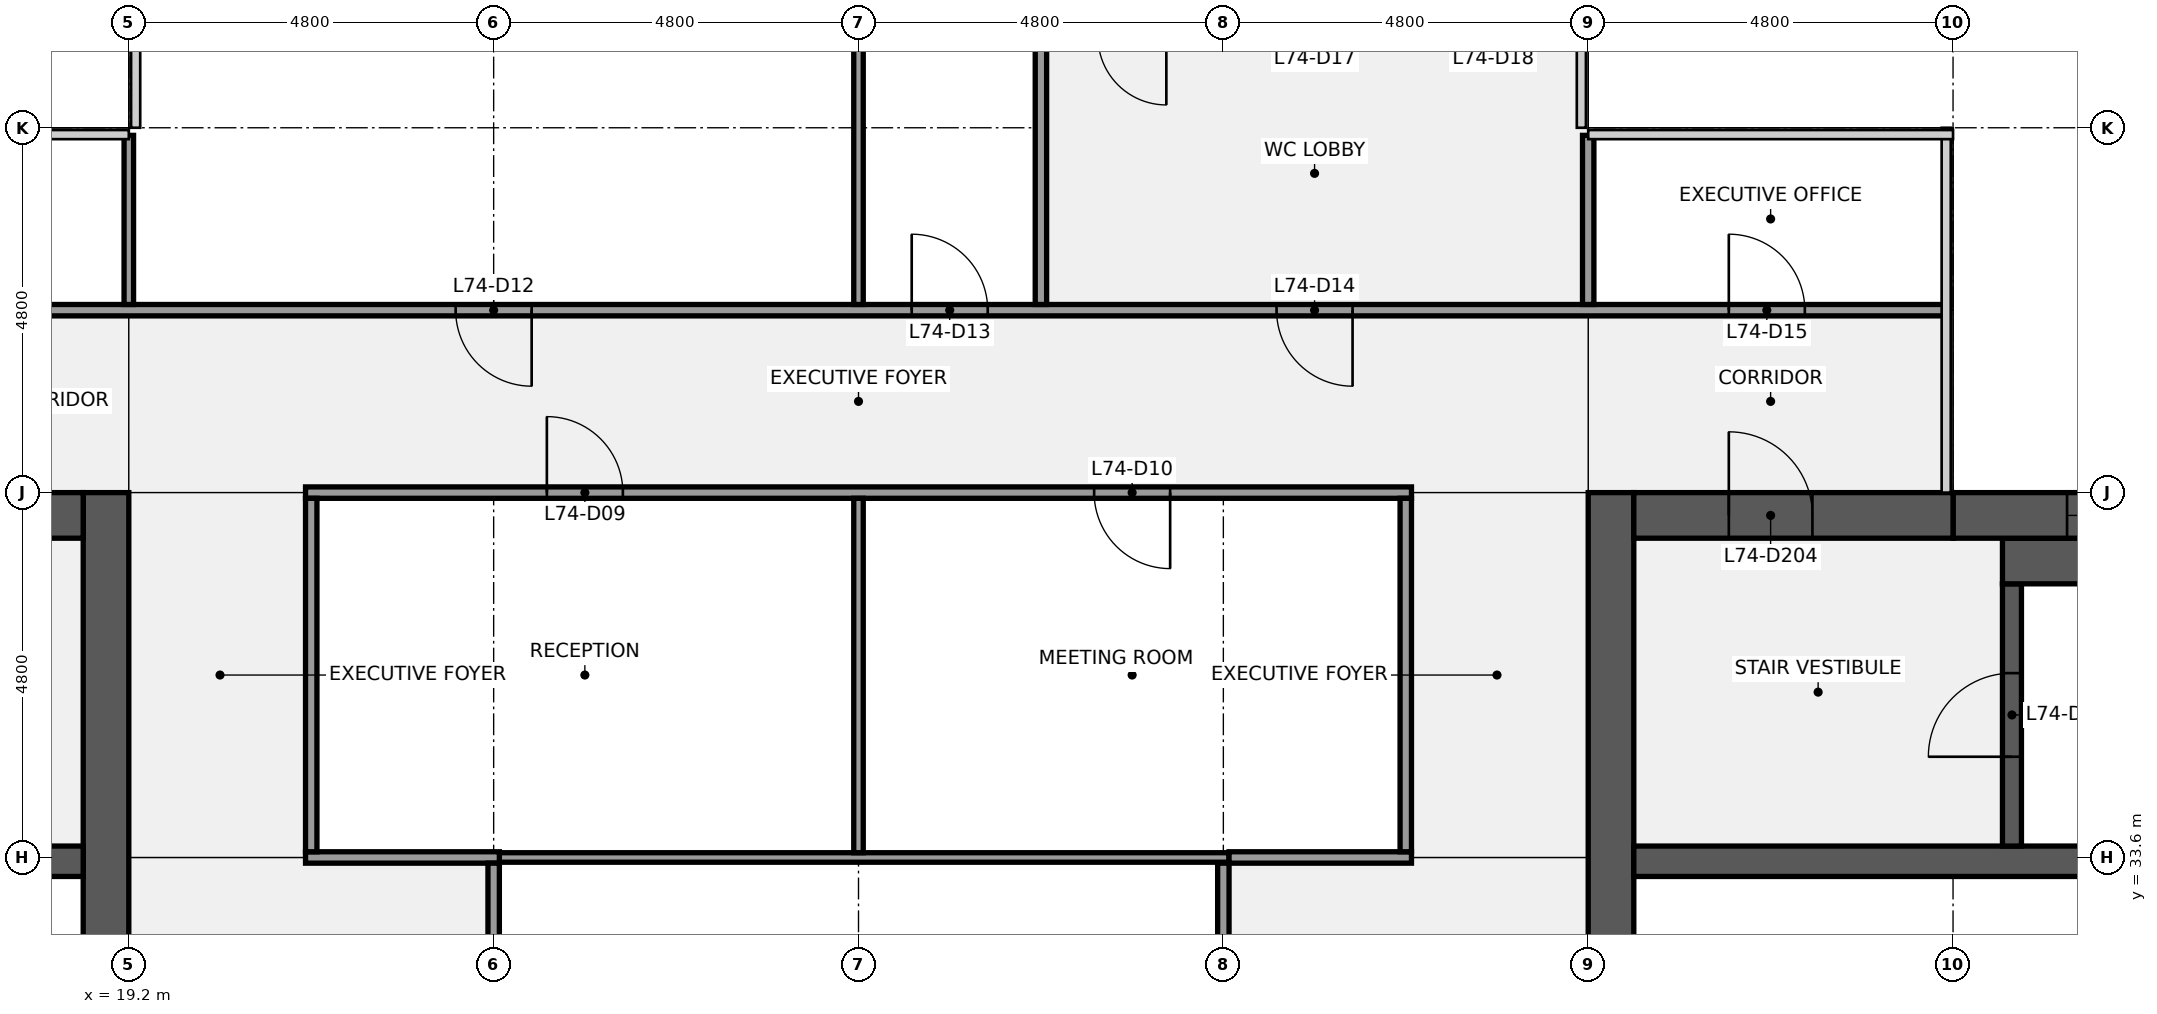
"""IFC4 building model, lengths in metres.
Left out: names, types, materials, properties, quantities, classifications, styles, units other than length and angle.
Written with IfcOpenShell. Run it as: python <this file> out.ifc"""

import sys

from ifc_helpers import new_model, si_unit, direction, frame, frame_2d, origin, place, context, subcontext, project, spatial, rectangle, extrude, element, fill, save


model = new_model("IFC4")
c1 = context("Model", 3, precision=1e-05, world=origin(), true_north=direction((0.0, 1.0)))
c2 = subcontext(c1, "Body", "Model", "MODEL_VIEW")
j1 = project(units=[si_unit("LENGTHUNIT", "METRE"), si_unit("PLANEANGLEUNIT", "RADIAN")], contexts=[c1])
p1 = place(None, origin())
s1 = spatial("IfcSite", under=j1, at=p1, CompositionType="ELEMENT")
p2 = place(p1, origin())
s2 = spatial("IfcBuilding", under=s1, at=p2, CompositionType="ELEMENT")
p3 = place(p2, frame((0.0, 0.0, 334.3)))
s3 = spatial("IfcBuildingStorey", under=s2, at=p3, CompositionType="ELEMENT", Elevation=334.3)
p4 = place(p3, frame((18.9, 38.4, 0.0), z_axis=(0.0, 0.0, 1.0), x_axis=(0.0, -1.0, 0.0)))
e1 = element("IfcWall", 1, at=p4, inside=s3, PredefinedType="SHEAR", context=c2, shape_type="SweptSolid", body=[
    extrude(rectangle(XDim=28.8, YDim=0.6, at=frame_2d((14.4, 0.0))), origin(), (0.0, 0.0, 1.0), 3.84),
])
p5 = place(p4, frame((18.3, 0.0, 0.0)))
e2 = element("IfcOpeningElement", 2, at=p5, cuts=e1, PredefinedType="OPENING", context=c2, shape_type="SweptSolid", body=[
    extrude(rectangle(XDim=1.8, YDim=2.1, at=frame_2d((0.9, 1.05))), frame((0.0, 0.31, 0.0), z_axis=(0.0, -1.0, 0.0), x_axis=(1.0, 0.0, 0.0)), (0.0, 0.0, 1.0), 0.62),
])
p6 = place(p4, frame((8.7, 0.0, 0.0)))
e3 = element("IfcOpeningElement", 3, at=p6, cuts=e1, PredefinedType="OPENING", context=c2, shape_type="SweptSolid", body=[
    extrude(rectangle(XDim=1.8, YDim=2.1, at=frame_2d((0.9, 1.05))), frame((0.0, 0.31, 0.0), z_axis=(0.0, -1.0, 0.0), x_axis=(1.0, 0.0, 0.0)), (0.0, 0.0, 1.0), 0.62),
])
p7 = place(p3, frame((0.6, 33.55, 0.0), z_axis=(0.0, 0.0, 1.0), x_axis=(1.0, 0.0, 0.0)))
e4 = element("IfcWall", 4, at=p7, inside=s3, PredefinedType="SHEAR", context=c2, shape_type="SweptSolid", body=[
    extrude(rectangle(XDim=18.0, YDim=0.4, at=frame_2d((9.0, 0.0))), origin(), (0.0, 0.0, 1.0), 3.84),
])
p8 = place(p3, frame((14.4, 38.1, 0.0), z_axis=(0.0, 0.0, 1.0), x_axis=(1.0, 0.0, 0.0)))
e5 = element("IfcWall", 5, at=p8, inside=s3, PredefinedType="SHEAR", context=c2, shape_type="SweptSolid", body=[
    extrude(rectangle(XDim=4.2, YDim=0.6, at=frame_2d((2.1, 0.0))), origin(), (0.0, 0.0, 1.0), 3.84),
])
p9 = place(p8, frame((1.85, 0.0, 0.0)))
e6 = element("IfcOpeningElement", 6, at=p9, cuts=e5, PredefinedType="OPENING", context=c2, shape_type="SweptSolid", body=[
    extrude(rectangle(XDim=1.1, YDim=2.1, at=frame_2d((0.55, 1.05))), frame((0.0, 0.31, 0.0), z_axis=(0.0, -1.0, 0.0), x_axis=(1.0, 0.0, 0.0)), (0.0, 0.0, 1.0), 0.62),
])
p10 = place(p3, frame((38.7, 9.6, 0.0), z_axis=(0.0, 0.0, 1.0), x_axis=(0.0, 1.0, 0.0)))
e7 = element("IfcWall", 7, at=p10, inside=s3, PredefinedType="SHEAR", context=c2, shape_type="SweptSolid", body=[
    extrude(rectangle(XDim=28.8, YDim=0.6, at=frame_2d((14.4, 0.0))), origin(), (0.0, 0.0, 1.0), 3.84),
])
p11 = place(p10, frame((8.7, 0.0, 0.0)))
e8 = element("IfcOpeningElement", 8, at=p11, cuts=e7, PredefinedType="OPENING", context=c2, shape_type="SweptSolid", body=[
    extrude(rectangle(XDim=1.8, YDim=2.1, at=frame_2d((0.9, 1.05))), frame((0.0, 0.31, 0.0), z_axis=(0.0, -1.0, 0.0), x_axis=(1.0, 0.0, 0.0)), (0.0, 0.0, 1.0), 0.62),
])
p12 = place(p10, frame((18.3, 0.0, 0.0)))
e9 = element("IfcOpeningElement", 9, at=p12, cuts=e7, PredefinedType="OPENING", context=c2, shape_type="SweptSolid", body=[
    extrude(rectangle(XDim=1.8, YDim=2.1, at=frame_2d((0.9, 1.05))), frame((0.0, 0.31, 0.0), z_axis=(0.0, -1.0, 0.0), x_axis=(1.0, 0.0, 0.0)), (0.0, 0.0, 1.0), 0.62),
])
p13 = place(p3, frame((39.0, 33.55, 0.0), z_axis=(0.0, 0.0, 1.0), x_axis=(1.0, 0.0, 0.0)))
e10 = element("IfcWall", 10, at=p13, inside=s3, PredefinedType="SHEAR", context=c2, shape_type="SweptSolid", body=[
    extrude(rectangle(XDim=18.0, YDim=0.4, at=frame_2d((9.0, 0.0))), origin(), (0.0, 0.0, 1.0), 3.84),
])
p14 = place(p3, frame((43.975, 33.75, 0.0), z_axis=(0.0, 0.0, 1.0), x_axis=(0.0, 1.0, 0.0)))
e11 = element("IfcWall", 11, at=p14, inside=s3, PredefinedType="SHEAR", context=c2, shape_type="SweptSolid", body=[
    extrude(rectangle(XDim=3.45, YDim=0.25, at=frame_2d((1.725, 0.0))), origin(), (0.0, 0.0, 1.0), 3.84),
])
p15 = place(p14, frame((1.175, 0.0, 0.0)))
e12 = element("IfcOpeningElement", 12, at=p15, cuts=e11, PredefinedType="OPENING", context=c2, shape_type="SweptSolid", body=[
    extrude(rectangle(XDim=1.1, YDim=2.1, at=frame_2d((0.55, 1.05))), frame((0.0, 0.135, 0.0), z_axis=(0.0, -1.0, 0.0), x_axis=(1.0, 0.0, 0.0)), (0.0, 0.0, 1.0), 0.27),
])
p16 = place(p3, frame((43.85, 37.5, 0.0), z_axis=(0.0, 0.0, 1.0), x_axis=(1.0, 0.0, 0.0)))
e13 = element("IfcWall", 13, at=p16, inside=s3, PredefinedType="SHEAR", context=c2, shape_type="SweptSolid", body=[
    extrude(rectangle(XDim=7.5, YDim=0.6, at=frame_2d((3.75, 0.0))), origin(), (0.0, 0.0, 1.0), 3.84),
])
p17 = place(p3, frame((43.2, 38.1, 0.0), z_axis=(0.0, 0.0, 1.0), x_axis=(1.0, 0.0, 0.0)))
e14 = element("IfcWall", 14, at=p17, inside=s3, PredefinedType="SHEAR", context=c2, shape_type="SweptSolid", body=[
    extrude(rectangle(XDim=13.8, YDim=0.6, at=frame_2d((6.9, 0.0))), origin(), (0.0, 0.0, 1.0), 3.84),
])
p18 = place(p17, frame((6.3, 0.0, 0.9)))
e15 = element("IfcOpeningElement", 15, at=p18, cuts=e14, PredefinedType="OPENING", context=c2, shape_type="SweptSolid", body=[
    extrude(rectangle(XDim=1.8, YDim=1.5, at=frame_2d((0.9, 0.75))), frame((0.0, 0.31, 0.0), z_axis=(0.0, -1.0, 0.0), x_axis=(1.0, 0.0, 0.0)), (0.0, 0.0, 1.0), 0.62),
])
p19 = place(p17, frame((1.5, 0.0, 0.9)))
e16 = element("IfcOpeningElement", 16, at=p19, cuts=e14, PredefinedType="OPENING", context=c2, shape_type="SweptSolid", body=[
    extrude(rectangle(XDim=1.8, YDim=1.5, at=frame_2d((0.9, 0.75))), frame((0.0, 0.31, 0.0), z_axis=(0.0, -1.0, 0.0), x_axis=(1.0, 0.0, 0.0)), (0.0, 0.0, 1.0), 0.62),
])
p20 = place(p3, frame((39.0, 38.1, 0.0), z_axis=(0.0, 0.0, 1.0), x_axis=(1.0, 0.0, 0.0)))
e17 = element("IfcWall", 17, at=p20, inside=s3, PredefinedType="SHEAR", context=c2, shape_type="SweptSolid", body=[
    extrude(rectangle(XDim=4.2, YDim=0.6, at=frame_2d((2.1, 0.0))), origin(), (0.0, 0.0, 1.0), 3.84),
])
p21 = place(p20, frame((1.25, 0.0, 0.0)))
e18 = element("IfcOpeningElement", 18, at=p21, cuts=e17, PredefinedType="OPENING", context=c2, shape_type="SweptSolid", body=[
    extrude(rectangle(XDim=1.1, YDim=2.1, at=frame_2d((0.55, 1.05))), frame((0.0, 0.31, 0.0), z_axis=(0.0, -1.0, 0.0), x_axis=(1.0, 0.0, 0.0)), (0.0, 0.0, 1.0), 0.62),
])
p22 = place(p3, frame((24.075, 33.6, 0.0), z_axis=(0.0, 0.0, 1.0), x_axis=(1.0, 0.0, 0.0)))
e19 = element("IfcWall", 19, at=p22, inside=s3, PredefinedType="PARTITIONING", context=c2, shape_type="SweptSolid", body=[
    extrude(rectangle(XDim=9.6, YDim=0.125, at=frame_2d((4.8, 0.0))), origin(), (0.0, 0.0, 1.0), 2.849),
])
p23 = place(p3, frame((21.525, 33.6, 0.0), z_axis=(0.0, 0.0, 1.0), x_axis=(1.0, 0.0, 0.0)))
e20 = element("IfcWall", 20, at=p23, inside=s3, PredefinedType="PARTITIONING", context=c2, shape_type="SweptSolid", body=[
    extrude(rectangle(XDim=2.55, YDim=0.15, at=frame_2d((1.275, 0.0))), origin(), (0.0, 0.0, 1.0), 2.849),
])
p24 = place(p3, frame((33.675, 33.6, 0.0), z_axis=(0.0, 0.0, 1.0), x_axis=(1.0, 0.0, 0.0)))
e21 = element("IfcWall", 21, at=p24, inside=s3, PredefinedType="PARTITIONING", context=c2, shape_type="SweptSolid", body=[
    extrude(rectangle(XDim=2.4, YDim=0.15, at=frame_2d((1.2, 0.0))), origin(), (0.0, 0.0, 1.0), 2.849),
])
p25 = place(p3, frame((21.525, 38.4, 0.0), z_axis=(0.0, 0.0, 1.0), x_axis=(1.0, 0.0, 0.0)))
e22 = element("IfcWall", 22, at=p25, inside=s3, PredefinedType="PARTITIONING", context=c2, shape_type="SweptSolid", body=[
    extrude(rectangle(XDim=14.55, YDim=0.15, at=frame_2d((7.275, 0.0))), origin(), (0.0, 0.0, 1.0), 2.849),
])
p26 = place(p25, frame((3.175, 0.0, 0.0)))
e23 = element("IfcOpeningElement", 23, at=p26, cuts=e22, PredefinedType="OPENING", context=c2, shape_type="SweptSolid", body=[
    extrude(rectangle(XDim=1.0, YDim=2.1, at=frame_2d((0.5, 1.05))), frame((0.0, 0.085, 0.0), z_axis=(0.0, -1.0, 0.0), x_axis=(1.0, 0.0, 0.0)), (0.0, 0.0, 1.0), 0.17),
])
p27 = place(p25, frame((10.375, 0.0, 0.0)))
e24 = element("IfcOpeningElement", 24, at=p27, cuts=e22, PredefinedType="OPENING", context=c2, shape_type="SweptSolid", body=[
    extrude(rectangle(XDim=1.0, YDim=2.1, at=frame_2d((0.5, 1.05))), frame((0.0, 0.085, 0.0), z_axis=(0.0, -1.0, 0.0), x_axis=(1.0, 0.0, 0.0)), (0.0, 0.0, 1.0), 0.17),
])
p28 = place(p3, frame((14.5, 40.8, 0.0), z_axis=(0.0, 0.0, 1.0), x_axis=(1.0, 0.0, 0.0)))
e25 = element("IfcWall", 25, at=p28, inside=s3, PredefinedType="PARTITIONING", context=c2, shape_type="SweptSolid", body=[
    extrude(rectangle(XDim=28.6, YDim=0.15, at=frame_2d((14.3, 0.0))), origin(), (0.0, 0.0, 1.0), 2.849),
])
p29 = place(p28, frame((1.85, 0.0, 0.0)))
e26 = element("IfcOpeningElement", 26, at=p29, cuts=e25, PredefinedType="OPENING", context=c2, shape_type="SweptSolid", body=[
    extrude(rectangle(XDim=1.0, YDim=2.1, at=frame_2d((0.5, 1.05))), frame((0.0, 0.085, 0.0), z_axis=(0.0, -1.0, 0.0), x_axis=(1.0, 0.0, 0.0)), (0.0, 0.0, 1.0), 0.17),
])
p30 = place(p28, frame((9.0, 0.0, 0.0)))
e27 = element("IfcOpeningElement", 27, at=p30, cuts=e25, PredefinedType="OPENING", context=c2, shape_type="SweptSolid", body=[
    extrude(rectangle(XDim=1.0, YDim=2.1, at=frame_2d((0.5, 1.05))), frame((0.0, 0.085, 0.0), z_axis=(0.0, -1.0, 0.0), x_axis=(1.0, 0.0, 0.0)), (0.0, 0.0, 1.0), 0.17),
])
p31 = place(p28, frame((15.0, 0.0, 0.0)))
e28 = element("IfcOpeningElement", 28, at=p31, cuts=e25, PredefinedType="OPENING", context=c2, shape_type="SweptSolid", body=[
    extrude(rectangle(XDim=1.0, YDim=2.1, at=frame_2d((0.5, 1.05))), frame((0.0, 0.085, 0.0), z_axis=(0.0, -1.0, 0.0), x_axis=(1.0, 0.0, 0.0)), (0.0, 0.0, 1.0), 0.17),
])
p32 = place(p28, frame((19.8, 0.0, 0.0)))
e29 = element("IfcOpeningElement", 29, at=p32, cuts=e25, PredefinedType="OPENING", context=c2, shape_type="SweptSolid", body=[
    extrude(rectangle(XDim=1.0, YDim=2.1, at=frame_2d((0.5, 1.05))), frame((0.0, 0.085, 0.0), z_axis=(0.0, -1.0, 0.0), x_axis=(1.0, 0.0, 0.0)), (0.0, 0.0, 1.0), 0.17),
])
p33 = place(p28, frame((25.75, 0.0, 0.0)))
e30 = element("IfcOpeningElement", 30, at=p33, cuts=e25, PredefinedType="OPENING", context=c2, shape_type="SweptSolid", body=[
    extrude(rectangle(XDim=1.0, YDim=2.1, at=frame_2d((0.5, 1.05))), frame((0.0, 0.085, 0.0), z_axis=(0.0, -1.0, 0.0), x_axis=(1.0, 0.0, 0.0)), (0.0, 0.0, 1.0), 0.17),
])
p34 = place(p3, frame((19.2, 40.875, 0.0), z_axis=(0.0, 0.0, 1.0), x_axis=(0.0, 1.0, 0.0)))
e31 = element("IfcWall", 31, at=p34, inside=s3, PredefinedType="PARTITIONING", context=c2, shape_type="SweptSolid", body=[
    extrude(rectangle(XDim=2.225, YDim=0.125, at=frame_2d((1.113, 0.0))), origin(), (0.0, 0.0, 1.0), 2.849),
])
p35 = place(p3, frame((21.6, 33.675, 0.0), z_axis=(0.0, 0.0, 1.0), x_axis=(0.0, 1.0, 0.0)))
e32 = element("IfcWall", 32, at=p35, inside=s3, PredefinedType="PARTITIONING", context=c2, shape_type="SweptSolid", body=[
    extrude(rectangle(XDim=4.65, YDim=0.15, at=frame_2d((2.325, 0.0))), origin(), (0.0, 0.0, 1.0), 2.849),
])
p36 = place(p3, frame((24.0, 20.475, 0.0), z_axis=(0.0, 0.0, 1.0), x_axis=(0.0, 1.0, 0.0)))
e33 = element("IfcWall", 33, at=p36, inside=s3, PredefinedType="PARTITIONING", context=c2, shape_type="SweptSolid", body=[
    extrude(rectangle(XDim=13.05, YDim=0.15, at=frame_2d((6.525, 0.0))), origin(), (0.0, 0.0, 1.0), 2.849),
])
p37 = place(p36, frame((6.025, 0.0, 0.0)))
e34 = element("IfcOpeningElement", 34, at=p37, cuts=e33, PredefinedType="OPENING", context=c2, shape_type="SweptSolid", body=[
    extrude(rectangle(XDim=1.0, YDim=2.1, at=frame_2d((0.5, 1.05))), frame((0.0, 0.085, 0.0), z_axis=(0.0, -1.0, 0.0), x_axis=(1.0, 0.0, 0.0)), (0.0, 0.0, 1.0), 0.17),
])
p38 = place(p3, frame((28.8, 33.663, 0.0), z_axis=(0.0, 0.0, 1.0), x_axis=(0.0, 1.0, 0.0)))
e35 = element("IfcWall", 35, at=p38, inside=s3, PredefinedType="PARTITIONING", context=c2, shape_type="SweptSolid", body=[
    extrude(rectangle(XDim=4.662, YDim=0.125, at=frame_2d((2.331, 0.0))), origin(), (0.0, 0.0, 1.0), 2.849),
])
p39 = place(p3, frame((28.8, 40.875, 0.0), z_axis=(0.0, 0.0, 1.0), x_axis=(0.0, 1.0, 0.0)))
e36 = element("IfcWall", 36, at=p39, inside=s3, PredefinedType="PARTITIONING", context=c2, shape_type="SweptSolid", body=[
    extrude(rectangle(XDim=6.625, YDim=0.125, at=frame_2d((3.312, 0.0))), origin(), (0.0, 0.0, 1.0), 2.849),
])
p40 = place(p3, frame((31.2, 40.875, 0.0), z_axis=(0.0, 0.0, 1.0), x_axis=(0.0, 1.0, 0.0)))
e37 = element("IfcWall", 37, at=p40, inside=s3, PredefinedType="PARTITIONING", context=c2, shape_type="SweptSolid", body=[
    extrude(rectangle(XDim=3.45, YDim=0.15, at=frame_2d((1.725, 0.0))), origin(), (0.0, 0.0, 1.0), 2.849),
])
p41 = place(p3, frame((33.6, 20.475, 0.0), z_axis=(0.0, 0.0, 1.0), x_axis=(0.0, 1.0, 0.0)))
e38 = element("IfcWall", 38, at=p41, inside=s3, PredefinedType="PARTITIONING", context=c2, shape_type="SweptSolid", body=[
    extrude(rectangle(XDim=13.05, YDim=0.15, at=frame_2d((6.525, 0.0))), origin(), (0.0, 0.0, 1.0), 2.849),
])
p42 = place(p3, frame((36.0, 33.675, 0.0), z_axis=(0.0, 0.0, 1.0), x_axis=(0.0, 1.0, 0.0)))
e39 = element("IfcWall", 39, at=p42, inside=s3, PredefinedType="PARTITIONING", context=c2, shape_type="SweptSolid", body=[
    extrude(rectangle(XDim=4.65, YDim=0.15, at=frame_2d((2.325, 0.0))), origin(), (0.0, 0.0, 1.0), 2.849),
])
p43 = place(p3, frame((38.4, 40.875, 0.0), z_axis=(0.0, 0.0, 1.0), x_axis=(0.0, 1.0, 0.0)))
e40 = element("IfcWall", 40, at=p43, inside=s3, PredefinedType="PARTITIONING", context=c2, shape_type="SweptSolid", body=[
    extrude(rectangle(XDim=2.225, YDim=0.15, at=frame_2d((1.113, 0.0))), origin(), (0.0, 0.0, 1.0), 2.849),
])
p44 = place(p15, origin())
e41 = element("IfcDoor", 41, at=p44, inside=s3, OperationType="SINGLE_SWING_LEFT", PredefinedType="DOOR", context=c2, shape_type="SweptSolid", body=[
    extrude(rectangle(XDim=1.1, YDim=2.1, at=frame_2d((0.55, 1.05))), frame((0.0, 0.025, 0.0), z_axis=(0.0, -1.0, 0.0), x_axis=(1.0, 0.0, 0.0)), (0.0, 0.0, 1.0), 0.05),
])
fill(e12, e41)
p45 = place(p21, origin())
e42 = element("IfcDoor", 42, at=p45, inside=s3, OperationType="SINGLE_SWING_LEFT", PredefinedType="DOOR", context=c2, shape_type="SweptSolid", body=[
    extrude(rectangle(XDim=1.1, YDim=2.1, at=frame_2d((0.55, 1.05))), frame((0.0, 0.025, 0.0), z_axis=(0.0, -1.0, 0.0), x_axis=(1.0, 0.0, 0.0)), (0.0, 0.0, 1.0), 0.05),
])
fill(e18, e42)
p46 = place(p19, origin())
e43 = element("IfcWindow", 43, at=p46, inside=s3, PartitioningType="SINGLE_PANEL", PredefinedType="WINDOW", context=c2, shape_type="SweptSolid", body=[
    extrude(rectangle(XDim=1.8, YDim=1.5, at=frame_2d((0.9, 0.75))), frame((0.0, 0.03, 0.0), z_axis=(0.0, -1.0, 0.0), x_axis=(1.0, 0.0, 0.0)), (0.0, 0.0, 1.0), 0.06),
])
fill(e16, e43)
p47 = place(p26, origin())
e44 = element("IfcDoor", 44, at=p47, inside=s3, OperationType="SINGLE_SWING_LEFT", PredefinedType="DOOR", context=c2, shape_type="SweptSolid", body=[
    extrude(rectangle(XDim=1.0, YDim=2.1, at=frame_2d((0.5, 1.05))), frame((0.0, 0.025, 0.0), z_axis=(0.0, -1.0, 0.0), x_axis=(1.0, 0.0, 0.0)), (0.0, 0.0, 1.0), 0.05),
])
fill(e23, e44)
p48 = place(p27, origin())
e45 = element("IfcDoor", 45, at=p48, inside=s3, OperationType="SINGLE_SWING_RIGHT", PredefinedType="DOOR", context=c2, shape_type="SweptSolid", body=[
    extrude(rectangle(XDim=1.0, YDim=2.1, at=frame_2d((0.5, 1.05))), frame((0.0, 0.025, 0.0), z_axis=(0.0, -1.0, 0.0), x_axis=(1.0, 0.0, 0.0)), (0.0, 0.0, 1.0), 0.05),
])
fill(e24, e45)
p49 = place(p30, origin())
e46 = element("IfcDoor", 46, at=p49, inside=s3, OperationType="SINGLE_SWING_RIGHT", PredefinedType="DOOR", context=c2, shape_type="SweptSolid", body=[
    extrude(rectangle(XDim=1.0, YDim=2.1, at=frame_2d((0.5, 1.05))), frame((0.0, 0.025, 0.0), z_axis=(0.0, -1.0, 0.0), x_axis=(1.0, 0.0, 0.0)), (0.0, 0.0, 1.0), 0.05),
])
fill(e27, e46)
p50 = place(p31, origin())
e47 = element("IfcDoor", 47, at=p50, inside=s3, OperationType="SINGLE_SWING_LEFT", PredefinedType="DOOR", context=c2, shape_type="SweptSolid", body=[
    extrude(rectangle(XDim=1.0, YDim=2.1, at=frame_2d((0.5, 1.05))), frame((0.0, 0.025, 0.0), z_axis=(0.0, -1.0, 0.0), x_axis=(1.0, 0.0, 0.0)), (0.0, 0.0, 1.0), 0.05),
])
fill(e28, e47)
p51 = place(p32, origin())
e48 = element("IfcDoor", 48, at=p51, inside=s3, OperationType="SINGLE_SWING_RIGHT", PredefinedType="DOOR", context=c2, shape_type="SweptSolid", body=[
    extrude(rectangle(XDim=1.0, YDim=2.1, at=frame_2d((0.5, 1.05))), frame((0.0, 0.025, 0.0), z_axis=(0.0, -1.0, 0.0), x_axis=(1.0, 0.0, 0.0)), (0.0, 0.0, 1.0), 0.05),
])
fill(e29, e48)
p52 = place(p33, origin())
e49 = element("IfcDoor", 49, at=p52, inside=s3, OperationType="SINGLE_SWING_LEFT", PredefinedType="DOOR", context=c2, shape_type="SweptSolid", body=[
    extrude(rectangle(XDim=1.0, YDim=2.1, at=frame_2d((0.5, 1.05))), frame((0.0, 0.025, 0.0), z_axis=(0.0, -1.0, 0.0), x_axis=(1.0, 0.0, 0.0)), (0.0, 0.0, 1.0), 0.05),
])
fill(e30, e49)
save(model, sys.argv[1])
